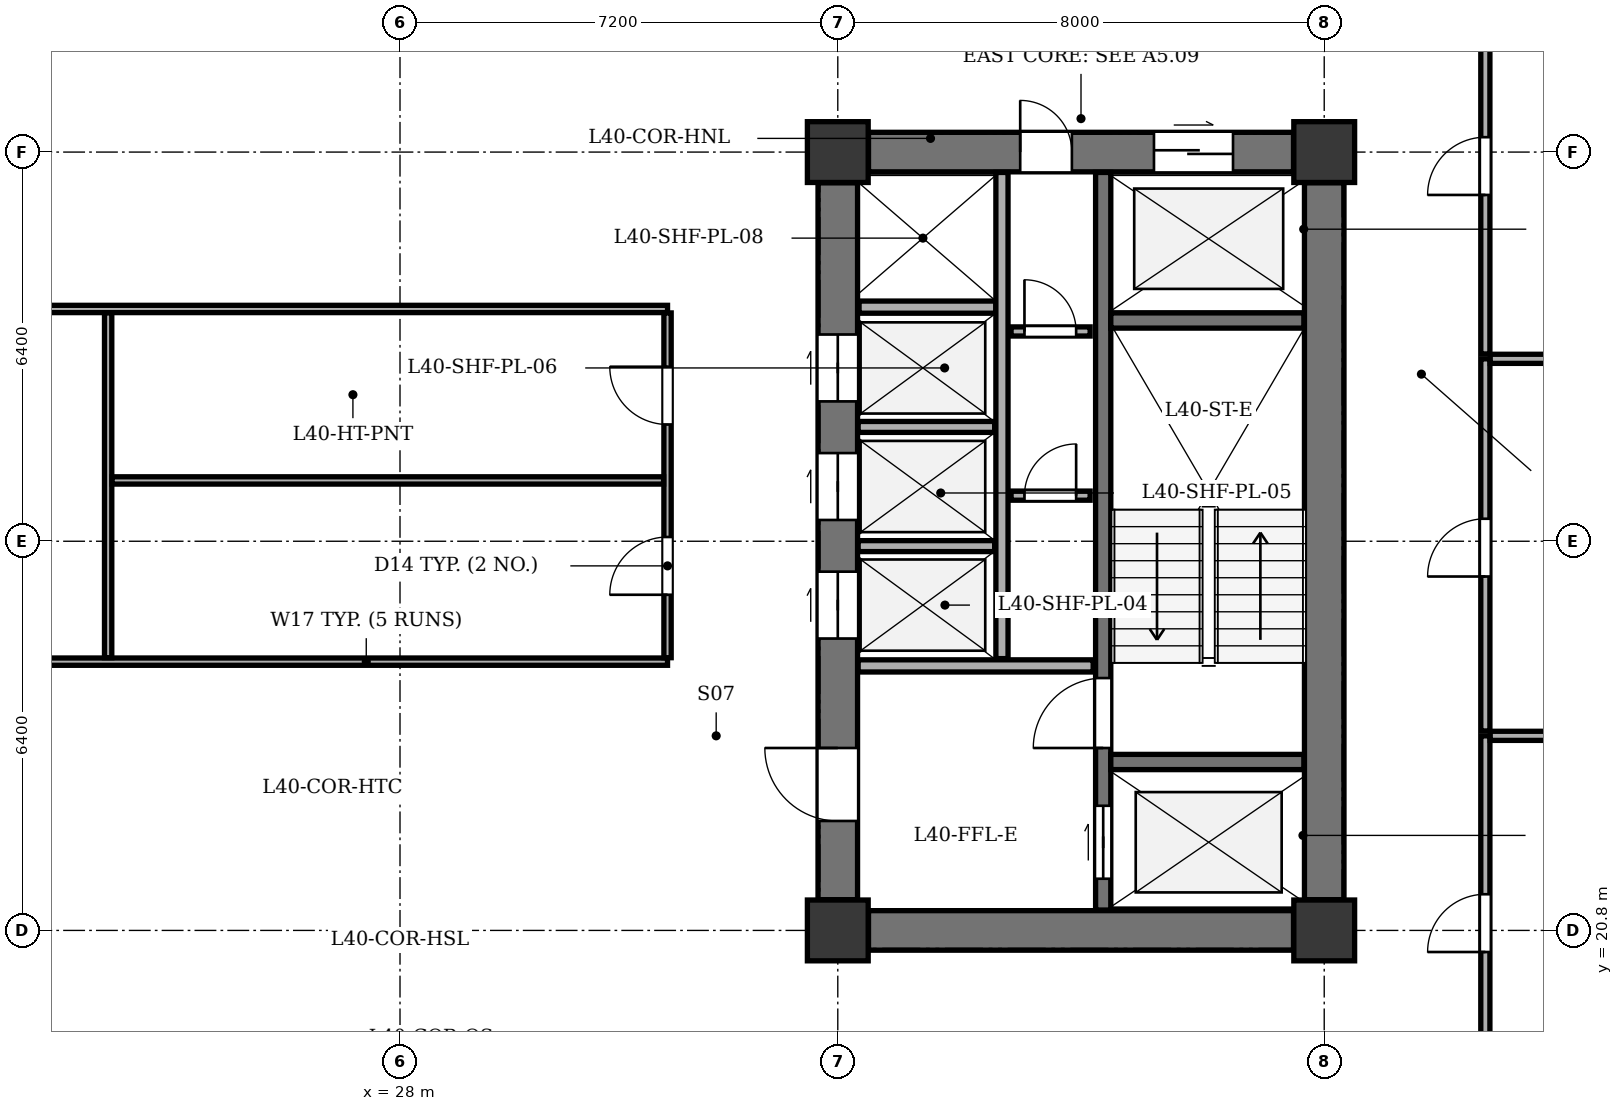
"""IFC4 building model, lengths in metres.
Left out: names, types, materials, properties, quantities, classifications, styles, units other than length and angle.
Written with IfcOpenShell. Run it as: python <this file> out.ifc"""

import sys

from ifc_helpers import new_model, si_unit, direction, frame, frame_2d, origin, origin_2d, place, context, subcontext, project, spatial, rectangle, extrude, element, fill, save


model = new_model("IFC4")
c1 = context("Model", 3, precision=1e-05, world=origin(), true_north=direction((0.0, 1.0)))
c2 = subcontext(c1, "Body", "Model", "MODEL_VIEW")
j1 = project(units=[si_unit("LENGTHUNIT", "METRE"), si_unit("PLANEANGLEUNIT", "RADIAN")], contexts=[c1])
p1 = place(None, origin())
s1 = spatial("IfcSite", under=j1, at=p1, CompositionType="ELEMENT")
p2 = place(p1, origin())
s2 = spatial("IfcBuilding", under=s1, at=p2, CompositionType="ELEMENT")
p3 = place(p2, frame((0.0, 0.0, 158.8)))
s3 = spatial("IfcBuildingStorey", under=s2, at=p3, CompositionType="ELEMENT", Elevation=158.8)
for number, where, z_axis, x_axis in (
    (1, (35.2, 20.8, 0.0), (0.0, 0.0, 1.0), (1.0, 0.0, 0.0)),
    (2, (43.2, 20.8, 0.0), (0.0, 0.0, 1.0), (1.0, 0.0, 0.0)),
    (3, (35.2, 33.6, 0.0), (0.0, 0.0, 1.0), (1.0, 0.0, 0.0)),
    (4, (43.2, 33.6, 0.0), (0.0, 0.0, 1.0), (1.0, 0.0, 0.0)),
):
    element("IfcColumn", number, at=place(p3, frame(where, z_axis=z_axis, x_axis=x_axis)), inside=s3, PredefinedType="COLUMN", context=c2, shape_type="SweptSolid", body=[
        extrude(rectangle(XDim=1.0, YDim=1.0, at=origin_2d()), origin(), (0.0, 0.0, 1.0), 3.5),
    ])
p4 = place(p3, frame((43.2, 21.305, 0.0), z_axis=(0.0, 0.0, 1.0), x_axis=(0.0, 1.0, 0.0)))
e5 = element("IfcWall", 5, at=p4, inside=s3, PredefinedType="SHEAR", context=c2, shape_type="SweptSolid", body=[
    extrude(rectangle(XDim=11.79, YDim=0.65, at=frame_2d((5.895, 0.0))), origin(), (0.0, 0.0, 1.0), 3.05),
])
p5 = place(p3, frame((35.705, 20.8, 0.0), z_axis=(0.0, 0.0, 1.0), x_axis=(1.0, 0.0, 0.0)))
e6 = element("IfcWall", 6, at=p5, inside=s3, PredefinedType="SHEAR", context=c2, shape_type="SweptSolid", body=[
    extrude(rectangle(XDim=6.99, YDim=0.65, at=frame_2d((3.495, 0.0))), origin(), (0.0, 0.0, 1.0), 3.05),
])
p6 = place(p3, frame((35.705, 33.6, 0.0), z_axis=(0.0, 0.0, 1.0), x_axis=(1.0, 0.0, 0.0)))
e7 = element("IfcWall", 7, at=p6, inside=s3, PredefinedType="SHEAR", context=c2, shape_type="SweptSolid", body=[
    extrude(rectangle(XDim=6.99, YDim=0.65, at=frame_2d((3.495, 0.0))), origin(), (0.0, 0.0, 1.0), 3.05),
])
p7 = place(p6, frame((4.695, 0.0, 0.0)))
e8 = element("IfcOpeningElement", 8, at=p7, cuts=e7, PredefinedType="OPENING", context=c2, shape_type="SweptSolid", body=[
    extrude(rectangle(XDim=1.3, YDim=2.15, at=frame_2d((0.65, 1.075))), frame((0.0, 0.335, 0.0), z_axis=(0.0, -1.0, 0.0), x_axis=(1.0, 0.0, 0.0)), (0.0, 0.0, 1.0), 0.67),
])
p8 = place(p6, frame((2.495, 0.0, 0.0)))
e9 = element("IfcOpeningElement", 9, at=p8, cuts=e7, PredefinedType="OPENING", context=c2, shape_type="SweptSolid", body=[
    extrude(rectangle(XDim=0.85, YDim=2.02, at=frame_2d((0.425, 1.01))), frame((0.0, 0.335, 0.0), z_axis=(0.0, -1.0, 0.0), x_axis=(1.0, 0.0, 0.0)), (0.0, 0.0, 1.0), 0.67),
])
p9 = place(p3, frame((35.2, 21.305, 0.0), z_axis=(0.0, 0.0, 1.0), x_axis=(0.0, 1.0, 0.0)))
e10 = element("IfcWall", 10, at=p9, inside=s3, PredefinedType="SHEAR", context=c2, shape_type="SweptSolid", body=[
    extrude(rectangle(XDim=11.79, YDim=0.65, at=frame_2d((5.895, 0.0))), origin(), (0.0, 0.0, 1.0), 3.05),
])
p10 = place(p9, frame((1.295, 0.0, 0.0)))
e11 = element("IfcOpeningElement", 11, at=p10, cuts=e10, PredefinedType="OPENING", context=c2, shape_type="SweptSolid", body=[
    extrude(rectangle(XDim=1.2, YDim=2.15, at=frame_2d((0.6, 1.075))), frame((0.0, 0.335, 0.0), z_axis=(0.0, -1.0, 0.0), x_axis=(1.0, 0.0, 0.0)), (0.0, 0.0, 1.0), 0.67),
])
p11 = place(p9, frame((4.295, 0.0, 0.0)))
e12 = element("IfcOpeningElement", 12, at=p11, cuts=e10, PredefinedType="OPENING", context=c2, shape_type="SweptSolid", body=[
    extrude(rectangle(XDim=1.1, YDim=2.1, at=frame_2d((0.55, 1.05))), frame((0.0, 0.335, 0.0), z_axis=(0.0, -1.0, 0.0), x_axis=(1.0, 0.0, 0.0)), (0.0, 0.0, 1.0), 0.67),
])
p12 = place(p9, frame((6.245, 0.0, 0.0)))
e13 = element("IfcOpeningElement", 13, at=p12, cuts=e10, PredefinedType="OPENING", context=c2, shape_type="SweptSolid", body=[
    extrude(rectangle(XDim=1.1, YDim=2.1, at=frame_2d((0.55, 1.05))), frame((0.0, 0.335, 0.0), z_axis=(0.0, -1.0, 0.0), x_axis=(1.0, 0.0, 0.0)), (0.0, 0.0, 1.0), 0.67),
])
p13 = place(p9, frame((8.195, 0.0, 0.0)))
e14 = element("IfcOpeningElement", 14, at=p13, cuts=e10, PredefinedType="OPENING", context=c2, shape_type="SweptSolid", body=[
    extrude(rectangle(XDim=1.1, YDim=2.1, at=frame_2d((0.55, 1.05))), frame((0.0, 0.335, 0.0), z_axis=(0.0, -1.0, 0.0), x_axis=(1.0, 0.0, 0.0)), (0.0, 0.0, 1.0), 0.67),
])
p14 = place(p3, frame((39.565, 21.135, 0.0), z_axis=(0.0, 0.0, 1.0), x_axis=(0.0, 1.0, 0.0)))
e15 = element("IfcWall", 15, at=p14, inside=s3, PredefinedType="SHEAR", context=c2, shape_type="SweptSolid", body=[
    extrude(rectangle(XDim=12.13, YDim=0.25, at=frame_2d((6.065, 0.0))), origin(), (0.0, 0.0, 1.0), 3.05),
])
p15 = place(p14, frame((0.515, 0.0, 0.0)))
e16 = element("IfcOpeningElement", 16, at=p15, cuts=e15, PredefinedType="OPENING", context=c2, shape_type="SweptSolid", body=[
    extrude(rectangle(XDim=1.2, YDim=2.15, at=frame_2d((0.6, 1.075))), frame((0.0, 0.135, 0.0), z_axis=(0.0, -1.0, 0.0), x_axis=(1.0, 0.0, 0.0)), (0.0, 0.0, 1.0), 0.27),
])
p16 = place(p14, frame((2.665, 0.0, 0.0)))
e17 = element("IfcOpeningElement", 17, at=p16, cuts=e15, PredefinedType="OPENING", context=c2, shape_type="SweptSolid", body=[
    extrude(rectangle(XDim=1.15, YDim=2.15, at=frame_2d((0.575, 1.075))), frame((0.0, 0.135, 0.0), z_axis=(0.0, -1.0, 0.0), x_axis=(1.0, 0.0, 0.0)), (0.0, 0.0, 1.0), 0.27),
])
for number, where, z_axis, x_axis in (
    (18, (39.69, 23.57, 0.0), (0.0, 0.0, 1.0), (1.0, 0.0, 0.0)),
    (19, (39.69, 30.83, 0.0), (0.0, 0.0, 1.0), (1.0, 0.0, 0.0)),
):
    element("IfcWall", number, at=place(p3, frame(where, z_axis=z_axis, x_axis=x_axis)), inside=s3, PredefinedType="SHEAR", context=c2, shape_type="SweptSolid", body=[
        extrude(rectangle(XDim=3.175, YDim=0.25, at=frame_2d((1.587, 0.0))), origin(), (0.0, 0.0, 1.0), 3.05),
    ])
p17 = place(p3, frame((35.535, 25.15, 0.0), z_axis=(0.0, 0.0, 1.0), x_axis=(1.0, 0.0, 0.0)))
e20 = element("IfcWall", 20, at=p17, inside=s3, PredefinedType="SOLIDWALL", context=c2, shape_type="SweptSolid", body=[
    extrude(rectangle(XDim=3.865, YDim=0.2, at=frame_2d((1.933, 0.0))), origin(), (0.0, 0.0, 1.0), 3.05),
])
p18 = place(p3, frame((35.55, 31.05, 0.0), z_axis=(0.0, 0.0, 1.0), x_axis=(1.0, 0.0, 0.0)))
e21 = element("IfcWall", 21, at=p18, inside=s3, PredefinedType="SOLIDWALL", context=c2, shape_type="SweptSolid", body=[
    extrude(rectangle(XDim=2.25, YDim=0.2, at=frame_2d((1.125, 0.0))), origin(), (0.0, 0.0, 1.0), 3.05),
])
p19 = place(p3, frame((37.9, 25.27, 0.0), z_axis=(0.0, 0.0, 1.0), x_axis=(0.0, 1.0, 0.0)))
e22 = element("IfcWall", 22, at=p19, inside=s3, PredefinedType="SOLIDWALL", context=c2, shape_type="SweptSolid", body=[
    extrude(rectangle(XDim=7.995, YDim=0.2, at=frame_2d((3.998, 0.0))), origin(), (0.0, 0.0, 1.0), 3.05),
])
for number, where, z_axis, x_axis in (
    (23, (35.535, 27.12, 0.0), (0.0, 0.0, 1.0), (1.0, 0.0, 0.0)),
    (24, (35.535, 29.08, 0.0), (0.0, 0.0, 1.0), (1.0, 0.0, 0.0)),
):
    element("IfcWall", number, at=place(p3, frame(where, z_axis=z_axis, x_axis=x_axis)), inside=s3, PredefinedType="PARTITIONING", context=c2, shape_type="SweptSolid", body=[
        extrude(rectangle(XDim=2.245, YDim=0.18, at=frame_2d((1.123, 0.0))), origin(), (0.0, 0.0, 1.0), 3.05),
    ])
p20 = place(p3, frame((38.05, 27.95, 0.0), z_axis=(0.0, 0.0, 1.0), x_axis=(1.0, 0.0, 0.0)))
e25 = element("IfcWall", 25, at=p20, inside=s3, PredefinedType="PARTITIONING", context=c2, shape_type="SweptSolid", body=[
    extrude(rectangle(XDim=1.3, YDim=0.15, at=frame_2d((0.65, 0.0))), origin(), (0.0, 0.0, 1.0), 3.05),
])
p21 = place(p20, frame((0.22, 0.0, 0.0)))
e26 = element("IfcOpeningElement", 26, at=p21, cuts=e25, PredefinedType="OPENING", context=c2, shape_type="SweptSolid", body=[
    extrude(rectangle(XDim=0.85, YDim=2.02, at=frame_2d((0.425, 1.01))), frame((0.0, 0.085, 0.0), z_axis=(0.0, -1.0, 0.0), x_axis=(1.0, 0.0, 0.0)), (0.0, 0.0, 1.0), 0.17),
])
p22 = place(p3, frame((38.05, 30.65, 0.0), z_axis=(0.0, 0.0, 1.0), x_axis=(1.0, 0.0, 0.0)))
e27 = element("IfcWall", 27, at=p22, inside=s3, PredefinedType="PARTITIONING", context=c2, shape_type="SweptSolid", body=[
    extrude(rectangle(XDim=1.3, YDim=0.15, at=frame_2d((0.65, 0.0))), origin(), (0.0, 0.0, 1.0), 3.05),
])
p23 = place(p22, frame((0.22, 0.0, 0.0)))
e28 = element("IfcOpeningElement", 28, at=p23, cuts=e27, PredefinedType="OPENING", context=c2, shape_type="SweptSolid", body=[
    extrude(rectangle(XDim=0.85, YDim=2.02, at=frame_2d((0.425, 1.01))), frame((0.0, 0.085, 0.0), z_axis=(0.0, -1.0, 0.0), x_axis=(1.0, 0.0, 0.0)), (0.0, 0.0, 1.0), 0.17),
])
p24 = place(p3, frame((20.46, 25.22, 0.0), z_axis=(0.0, 0.0, 1.0), x_axis=(1.0, 0.0, 0.0)))
e29 = element("IfcWall", 29, at=p24, inside=s3, PredefinedType="PARTITIONING", context=c2, shape_type="SweptSolid", body=[
    extrude(rectangle(XDim=11.94, YDim=0.12, at=frame_2d((5.97, 0.0))), origin(), (0.0, 0.0, 1.0), 3.05),
])
p25 = place(p24, frame((0.68, 0.0, 0.0)))
e30 = element("IfcOpeningElement", 30, at=p25, cuts=e29, PredefinedType="OPENING", context=c2, shape_type="SweptSolid", body=[
    extrude(rectangle(XDim=1.0, YDim=2.1, at=frame_2d((0.5, 1.05))), frame((0.0, 0.07, 0.0), z_axis=(0.0, -1.0, 0.0), x_axis=(1.0, 0.0, 0.0)), (0.0, 0.0, 1.0), 0.14),
])
p26 = place(p3, frame((20.46, 31.02, 0.0), z_axis=(0.0, 0.0, 1.0), x_axis=(1.0, 0.0, 0.0)))
e31 = element("IfcWall", 31, at=p26, inside=s3, PredefinedType="PARTITIONING", context=c2, shape_type="SweptSolid", body=[
    extrude(rectangle(XDim=11.94, YDim=0.12, at=frame_2d((5.97, 0.0))), origin(), (0.0, 0.0, 1.0), 3.05),
])
p27 = place(p3, frame((32.4, 25.285, 0.0), z_axis=(0.0, 0.0, 1.0), x_axis=(0.0, 1.0, 0.0)))
e32 = element("IfcWall", 32, at=p27, inside=s3, PredefinedType="PARTITIONING", context=c2, shape_type="SweptSolid", body=[
    extrude(rectangle(XDim=5.67, YDim=0.12, at=frame_2d((2.835, 0.0))), origin(), (0.0, 0.0, 1.0), 3.05),
])
p28 = place(p27, frame((1.035, 0.0, 0.0)))
e33 = element("IfcOpeningElement", 33, at=p28, cuts=e32, PredefinedType="OPENING", context=c2, shape_type="SweptSolid", body=[
    extrude(rectangle(XDim=0.95, YDim=2.1, at=frame_2d((0.475, 1.05))), frame((0.0, 0.07, 0.0), z_axis=(0.0, -1.0, 0.0), x_axis=(1.0, 0.0, 0.0)), (0.0, 0.0, 1.0), 0.14),
])
p29 = place(p27, frame((3.835, 0.0, 0.0)))
e34 = element("IfcOpeningElement", 34, at=p29, cuts=e32, PredefinedType="OPENING", context=c2, shape_type="SweptSolid", body=[
    extrude(rectangle(XDim=0.95, YDim=2.1, at=frame_2d((0.475, 1.05))), frame((0.0, 0.07, 0.0), z_axis=(0.0, -1.0, 0.0), x_axis=(1.0, 0.0, 0.0)), (0.0, 0.0, 1.0), 0.14),
])
p30 = place(p3, frame((23.2, 25.285, 0.0), z_axis=(0.0, 0.0, 1.0), x_axis=(0.0, 1.0, 0.0)))
e35 = element("IfcWall", 35, at=p30, inside=s3, PredefinedType="PARTITIONING", context=c2, shape_type="SweptSolid", body=[
    extrude(rectangle(XDim=5.67, YDim=0.12, at=frame_2d((2.835, 0.0))), origin(), (0.0, 0.0, 1.0), 3.05),
])
p31 = place(p3, frame((23.265, 28.2, 0.0), z_axis=(0.0, 0.0, 1.0), x_axis=(1.0, 0.0, 0.0)))
e36 = element("IfcWall", 36, at=p31, inside=s3, PredefinedType="PARTITIONING", context=c2, shape_type="SweptSolid", body=[
    extrude(rectangle(XDim=9.07, YDim=0.12, at=frame_2d((4.535, 0.0))), origin(), (0.0, 0.0, 1.0), 3.05),
])
p32 = place(p3, frame((45.85, 17.93, 0.0), z_axis=(0.0, 0.0, 1.0), x_axis=(0.0, 1.0, 0.0)))
e37 = element("IfcWall", 37, at=p32, inside=s3, PredefinedType="PARTITIONING", context=c2, shape_type="SweptSolid", body=[
    extrude(rectangle(XDim=6.07, YDim=0.15, at=frame_2d((3.035, 0.0))), origin(), (0.0, 0.0, 1.0), 3.05),
])
p33 = place(p32, frame((2.515, 0.0, 0.0)))
e38 = element("IfcOpeningElement", 38, at=p33, cuts=e37, PredefinedType="OPENING", context=c2, shape_type="SweptSolid", body=[
    extrude(rectangle(XDim=0.95, YDim=2.1, at=frame_2d((0.475, 1.05))), frame((0.0, 0.085, 0.0), z_axis=(0.0, -1.0, 0.0), x_axis=(1.0, 0.0, 0.0)), (0.0, 0.0, 1.0), 0.17),
])
p34 = place(p3, frame((45.93, 24.0, 0.0), z_axis=(0.0, 0.0, 1.0), x_axis=(1.0, 0.0, 0.0)))
e39 = element("IfcWall", 39, at=p34, inside=s3, PredefinedType="PARTITIONING", context=c2, shape_type="SweptSolid", body=[
    extrude(rectangle(XDim=9.395, YDim=0.15, at=frame_2d((4.698, 0.0))), origin(), (0.0, 0.0, 1.0), 3.05),
])
p35 = place(p3, frame((45.85, 24.08, 0.0), z_axis=(0.0, 0.0, 1.0), x_axis=(0.0, 1.0, 0.0)))
e40 = element("IfcWall", 40, at=p35, inside=s3, PredefinedType="PARTITIONING", context=c2, shape_type="SweptSolid", body=[
    extrude(rectangle(XDim=6.12, YDim=0.15, at=frame_2d((3.06, 0.0))), origin(), (0.0, 0.0, 1.0), 3.05),
])
p36 = place(p35, frame((2.54, 0.0, 0.0)))
e41 = element("IfcOpeningElement", 41, at=p36, cuts=e40, PredefinedType="OPENING", context=c2, shape_type="SweptSolid", body=[
    extrude(rectangle(XDim=0.95, YDim=2.1, at=frame_2d((0.475, 1.05))), frame((0.0, 0.085, 0.0), z_axis=(0.0, -1.0, 0.0), x_axis=(1.0, 0.0, 0.0)), (0.0, 0.0, 1.0), 0.17),
])
p37 = place(p3, frame((45.93, 30.2, 0.0), z_axis=(0.0, 0.0, 1.0), x_axis=(1.0, 0.0, 0.0)))
e42 = element("IfcWall", 42, at=p37, inside=s3, PredefinedType="PARTITIONING", context=c2, shape_type="SweptSolid", body=[
    extrude(rectangle(XDim=9.395, YDim=0.15, at=frame_2d((4.698, 0.0))), origin(), (0.0, 0.0, 1.0), 3.05),
])
p38 = place(p3, frame((45.85, 30.28, 0.0), z_axis=(0.0, 0.0, 1.0), x_axis=(0.0, 1.0, 0.0)))
e43 = element("IfcWall", 43, at=p38, inside=s3, PredefinedType="PARTITIONING", context=c2, shape_type="SweptSolid", body=[
    extrude(rectangle(XDim=6.19, YDim=0.15, at=frame_2d((3.095, 0.0))), origin(), (0.0, 0.0, 1.0), 3.05),
])
p39 = place(p38, frame((2.615, 0.0, 0.0)))
e44 = element("IfcOpeningElement", 44, at=p39, cuts=e43, PredefinedType="OPENING", context=c2, shape_type="SweptSolid", body=[
    extrude(rectangle(XDim=0.95, YDim=2.1, at=frame_2d((0.475, 1.05))), frame((0.0, 0.085, 0.0), z_axis=(0.0, -1.0, 0.0), x_axis=(1.0, 0.0, 0.0)), (0.0, 0.0, 1.0), 0.17),
])
p40 = place(p7, origin())
e45 = element("IfcDoor", 45, at=p40, inside=s3, OperationType="DOUBLE_DOOR_SLIDING", PredefinedType="DOOR", context=c2, shape_type="SweptSolid", body=[
    extrude(rectangle(XDim=1.3, YDim=2.15, at=frame_2d((0.65, 1.075))), frame((0.0, 0.025, 0.0), z_axis=(0.0, -1.0, 0.0), x_axis=(1.0, 0.0, 0.0)), (0.0, 0.0, 1.0), 0.05),
])
fill(e8, e45)
p41 = place(p8, origin())
e46 = element("IfcDoor", 46, at=p41, inside=s3, OperationType="SINGLE_SWING_LEFT", PredefinedType="DOOR", context=c2, shape_type="SweptSolid", body=[
    extrude(rectangle(XDim=0.85, YDim=2.02, at=frame_2d((0.425, 1.01))), frame((0.0, 0.025, 0.0), z_axis=(0.0, -1.0, 0.0), x_axis=(1.0, 0.0, 0.0)), (0.0, 0.0, 1.0), 0.05),
])
fill(e9, e46)
p42 = place(p10, origin())
e47 = element("IfcDoor", 47, at=p42, inside=s3, OperationType="SINGLE_SWING_RIGHT", PredefinedType="DOOR", context=c2, shape_type="SweptSolid", body=[
    extrude(rectangle(XDim=1.2, YDim=2.15, at=frame_2d((0.6, 1.075))), frame((0.0, 0.025, 0.0), z_axis=(0.0, -1.0, 0.0), x_axis=(1.0, 0.0, 0.0)), (0.0, 0.0, 1.0), 0.05),
])
fill(e11, e47)
p43 = place(p11, origin())
e48 = element("IfcDoor", 48, at=p43, inside=s3, OperationType="DOUBLE_DOOR_SLIDING", PredefinedType="DOOR", context=c2, shape_type="SweptSolid", body=[
    extrude(rectangle(XDim=1.1, YDim=2.1, at=frame_2d((0.55, 1.05))), frame((0.0, 0.025, 0.0), z_axis=(0.0, -1.0, 0.0), x_axis=(1.0, 0.0, 0.0)), (0.0, 0.0, 1.0), 0.05),
])
fill(e12, e48)
p44 = place(p12, origin())
e49 = element("IfcDoor", 49, at=p44, inside=s3, OperationType="DOUBLE_DOOR_SLIDING", PredefinedType="DOOR", context=c2, shape_type="SweptSolid", body=[
    extrude(rectangle(XDim=1.1, YDim=2.1, at=frame_2d((0.55, 1.05))), frame((0.0, 0.025, 0.0), z_axis=(0.0, -1.0, 0.0), x_axis=(1.0, 0.0, 0.0)), (0.0, 0.0, 1.0), 0.05),
])
fill(e13, e49)
p45 = place(p13, origin())
e50 = element("IfcDoor", 50, at=p45, inside=s3, OperationType="DOUBLE_DOOR_SLIDING", PredefinedType="DOOR", context=c2, shape_type="SweptSolid", body=[
    extrude(rectangle(XDim=1.1, YDim=2.1, at=frame_2d((0.55, 1.05))), frame((0.0, 0.025, 0.0), z_axis=(0.0, -1.0, 0.0), x_axis=(1.0, 0.0, 0.0)), (0.0, 0.0, 1.0), 0.05),
])
fill(e14, e50)
p46 = place(p15, origin())
e51 = element("IfcDoor", 51, at=p46, inside=s3, OperationType="DOUBLE_DOOR_SLIDING", PredefinedType="DOOR", context=c2, shape_type="SweptSolid", body=[
    extrude(rectangle(XDim=1.2, YDim=2.15, at=frame_2d((0.6, 1.075))), frame((0.0, 0.025, 0.0), z_axis=(0.0, -1.0, 0.0), x_axis=(1.0, 0.0, 0.0)), (0.0, 0.0, 1.0), 0.05),
])
fill(e16, e51)
p47 = place(p16, origin())
e52 = element("IfcDoor", 52, at=p47, inside=s3, OperationType="SINGLE_SWING_LEFT", PredefinedType="DOOR", context=c2, shape_type="SweptSolid", body=[
    extrude(rectangle(XDim=1.15, YDim=2.15, at=frame_2d((0.575, 1.075))), frame((0.0, 0.025, 0.0), z_axis=(0.0, -1.0, 0.0), x_axis=(1.0, 0.0, 0.0)), (0.0, 0.0, 1.0), 0.05),
])
fill(e17, e52)
p48 = place(p21, origin())
e53 = element("IfcDoor", 53, at=p48, inside=s3, OperationType="SINGLE_SWING_RIGHT", PredefinedType="DOOR", context=c2, shape_type="SweptSolid", body=[
    extrude(rectangle(XDim=0.85, YDim=2.02, at=frame_2d((0.425, 1.01))), frame((0.0, 0.025, 0.0), z_axis=(0.0, -1.0, 0.0), x_axis=(1.0, 0.0, 0.0)), (0.0, 0.0, 1.0), 0.05),
])
fill(e26, e53)
p49 = place(p23, origin())
e54 = element("IfcDoor", 54, at=p49, inside=s3, OperationType="SINGLE_SWING_LEFT", PredefinedType="DOOR", context=c2, shape_type="SweptSolid", body=[
    extrude(rectangle(XDim=0.85, YDim=2.02, at=frame_2d((0.425, 1.01))), frame((0.0, 0.025, 0.0), z_axis=(0.0, -1.0, 0.0), x_axis=(1.0, 0.0, 0.0)), (0.0, 0.0, 1.0), 0.05),
])
fill(e28, e54)
p50 = place(p28, origin())
e55 = element("IfcDoor", 55, at=p50, inside=s3, OperationType="SINGLE_SWING_LEFT", PredefinedType="DOOR", context=c2, shape_type="SweptSolid", body=[
    extrude(rectangle(XDim=0.95, YDim=2.1, at=frame_2d((0.475, 1.05))), frame((0.0, 0.025, 0.0), z_axis=(0.0, -1.0, 0.0), x_axis=(1.0, 0.0, 0.0)), (0.0, 0.0, 1.0), 0.05),
])
fill(e33, e55)
p51 = place(p29, origin())
e56 = element("IfcDoor", 56, at=p51, inside=s3, OperationType="SINGLE_SWING_RIGHT", PredefinedType="DOOR", context=c2, shape_type="SweptSolid", body=[
    extrude(rectangle(XDim=0.95, YDim=2.1, at=frame_2d((0.475, 1.05))), frame((0.0, 0.025, 0.0), z_axis=(0.0, -1.0, 0.0), x_axis=(1.0, 0.0, 0.0)), (0.0, 0.0, 1.0), 0.05),
])
fill(e34, e56)
p52 = place(p33, origin())
e57 = element("IfcDoor", 57, at=p52, inside=s3, OperationType="SINGLE_SWING_LEFT", PredefinedType="DOOR", context=c2, shape_type="SweptSolid", body=[
    extrude(rectangle(XDim=0.95, YDim=2.1, at=frame_2d((0.475, 1.05))), frame((0.0, 0.025, 0.0), z_axis=(0.0, -1.0, 0.0), x_axis=(1.0, 0.0, 0.0)), (0.0, 0.0, 1.0), 0.05),
])
fill(e38, e57)
p53 = place(p36, origin())
e58 = element("IfcDoor", 58, at=p53, inside=s3, OperationType="SINGLE_SWING_LEFT", PredefinedType="DOOR", context=c2, shape_type="SweptSolid", body=[
    extrude(rectangle(XDim=0.95, YDim=2.1, at=frame_2d((0.475, 1.05))), frame((0.0, 0.025, 0.0), z_axis=(0.0, -1.0, 0.0), x_axis=(1.0, 0.0, 0.0)), (0.0, 0.0, 1.0), 0.05),
])
fill(e41, e58)
p54 = place(p39, origin())
e59 = element("IfcDoor", 59, at=p54, inside=s3, OperationType="SINGLE_SWING_LEFT", PredefinedType="DOOR", context=c2, shape_type="SweptSolid", body=[
    extrude(rectangle(XDim=0.95, YDim=2.1, at=frame_2d((0.475, 1.05))), frame((0.0, 0.025, 0.0), z_axis=(0.0, -1.0, 0.0), x_axis=(1.0, 0.0, 0.0)), (0.0, 0.0, 1.0), 0.05),
])
fill(e44, e59)
save(model, sys.argv[1])
